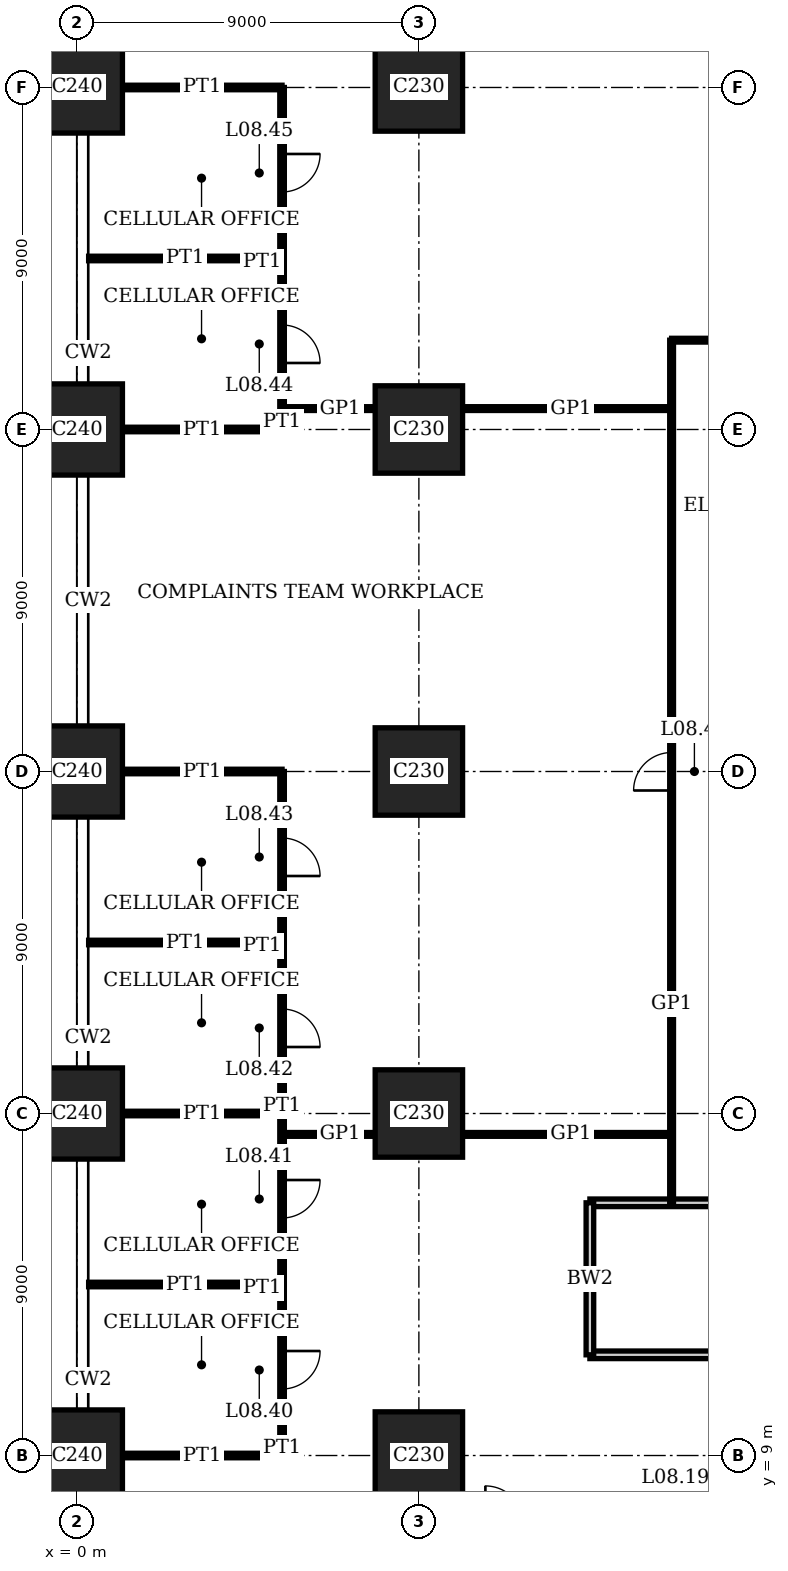
"""IFC4 building model, lengths in metres.
Left out: names, types, materials, properties, quantities, classifications, styles, units other than length and angle.
Written with IfcOpenShell. Run it as: python <this file> out.ifc"""

import sys

from ifc_helpers import new_model, si_unit, direction, frame, frame_2d, origin, origin_2d, place, context, subcontext, project, spatial, rectangle, extrude, element, fill, save


model = new_model("IFC4")
c1 = context("Model", 3, precision=1e-05, world=origin(), true_north=direction((0.0, 1.0)))
c2 = subcontext(c1, "Body", "Model", "MODEL_VIEW")
j1 = project(units=[si_unit("LENGTHUNIT", "METRE"), si_unit("PLANEANGLEUNIT", "RADIAN")], contexts=[c1])
p1 = place(None, origin())
s1 = spatial("IfcSite", under=j1, at=p1, CompositionType="ELEMENT")
p2 = place(p1, origin())
s2 = spatial("IfcBuilding", under=s1, at=p2, CompositionType="ELEMENT")
p3 = place(p2, frame((0.0, 0.0, 35.8)))
s3 = spatial("IfcBuildingStorey", under=s2, at=p3, CompositionType="ELEMENT", Elevation=35.8)
for number, where, z_axis, x_axis in (
    (1, (0.0, 9.0, 0.0), (0.0, 0.0, 1.0), (1.0, 0.0, 0.0)),
    (2, (0.0, 18.0, 0.0), (0.0, 0.0, 1.0), (1.0, 0.0, 0.0)),
    (3, (0.0, 27.0, 0.0), (0.0, 0.0, 1.0), (1.0, 0.0, 0.0)),
    (4, (0.0, 36.0, 0.0), (0.0, 0.0, 1.0), (1.0, 0.0, 0.0)),
    (5, (0.0, 45.0, 0.0), (0.0, 0.0, 1.0), (1.0, 0.0, 0.0)),
):
    element("IfcColumn", number, at=place(p3, frame(where, z_axis=z_axis, x_axis=x_axis)), inside=s3, PredefinedType="COLUMN", context=c2, shape_type="SweptSolid", body=[
        extrude(rectangle(XDim=2.4, YDim=2.4, at=origin_2d()), origin(), (0.0, 0.0, 1.0), 4.0),
    ])
for number, where, z_axis, x_axis in (
    (6, (9.0, 9.0, 0.0), (0.0, 0.0, 1.0), (1.0, 0.0, 0.0)),
    (7, (9.0, 18.0, 0.0), (0.0, 0.0, 1.0), (1.0, 0.0, 0.0)),
    (8, (9.0, 27.0, 0.0), (0.0, 0.0, 1.0), (1.0, 0.0, 0.0)),
    (9, (9.0, 36.0, 0.0), (0.0, 0.0, 1.0), (1.0, 0.0, 0.0)),
    (10, (9.0, 45.0, 0.0), (0.0, 0.0, 1.0), (1.0, 0.0, 0.0)),
):
    element("IfcColumn", number, at=place(p3, frame(where, z_axis=z_axis, x_axis=x_axis)), inside=s3, PredefinedType="COLUMN", context=c2, shape_type="SweptSolid", body=[
        extrude(rectangle(XDim=2.3, YDim=2.3, at=origin_2d()), origin(), (0.0, 0.0, 1.0), 4.0),
    ])
p4 = place(p3, frame((1.2, 9.0, 0.0), z_axis=(0.0, 0.0, 1.0), x_axis=(1.0, 0.0, 0.0)))
e11 = element("IfcWall", 11, at=p4, inside=s3, PredefinedType="PARTITIONING", context=c2, shape_type="SweptSolid", body=[
    extrude(rectangle(XDim=4.2, YDim=0.12, at=frame_2d((2.1, 0.0))), origin(), (0.0, 0.0, 1.0), 3.05),
])
p5 = place(p3, frame((13.5, 11.65, 0.0), z_axis=(0.0, 0.0, 1.0), x_axis=(1.0, 0.0, 0.0)))
e12 = element("IfcWall", 12, at=p5, inside=s3, PredefinedType="SOLIDWALL", context=c2, shape_type="SweptSolid", body=[
    extrude(rectangle(XDim=9.0, YDim=0.2, at=frame_2d((4.5, 0.0))), origin(), (0.0, 0.0, 1.0), 3.75),
])
p6 = place(p5, frame((4.0, 0.0, 0.0)))
e13 = element("IfcOpeningElement", 13, at=p6, cuts=e12, PredefinedType="OPENING", context=c2, shape_type="SweptSolid", body=[
    extrude(rectangle(XDim=1.0, YDim=2.4, at=frame_2d((0.5, 1.2))), frame((0.0, 0.11, 0.0), z_axis=(0.0, -1.0, 0.0), x_axis=(1.0, 0.0, 0.0)), (0.0, 0.0, 1.0), 0.22),
])
p7 = place(p3, frame((0.31, 13.5, 0.0), z_axis=(0.0, 0.0, 1.0), x_axis=(1.0, 0.0, 0.0)))
e14 = element("IfcWall", 14, at=p7, inside=s3, PredefinedType="PARTITIONING", context=c2, shape_type="SweptSolid", body=[
    extrude(rectangle(XDim=5.09, YDim=0.12, at=frame_2d((2.545, 0.0))), origin(), (0.0, 0.0, 1.0), 3.1),
])
p8 = place(p3, frame((13.5, 15.65, 0.0), z_axis=(0.0, 0.0, 1.0), x_axis=(1.0, 0.0, 0.0)))
e15 = element("IfcWall", 15, at=p8, inside=s3, PredefinedType="SOLIDWALL", context=c2, shape_type="SweptSolid", body=[
    extrude(rectangle(XDim=9.0, YDim=0.2, at=frame_2d((4.5, 0.0))), origin(), (0.0, 0.0, 1.0), 3.75),
])
p9 = place(p3, frame((5.39, 17.45, 0.0), z_axis=(0.0, 0.0, 1.0), x_axis=(1.0, 0.0, 0.0)))
e16 = element("IfcWall", 16, at=p9, inside=s3, PredefinedType="PARTITIONING", context=c2, shape_type="SweptSolid", body=[
    extrude(rectangle(XDim=2.46, YDim=0.1, at=frame_2d((1.23, 0.0))), origin(), (0.0, 0.0, 1.0), 3.75),
])
p10 = place(p3, frame((10.15, 17.45, 0.0), z_axis=(0.0, 0.0, 1.0), x_axis=(1.0, 0.0, 0.0)))
e17 = element("IfcWall", 17, at=p10, inside=s3, PredefinedType="PARTITIONING", context=c2, shape_type="SweptSolid", body=[
    extrude(rectangle(XDim=5.5, YDim=0.1, at=frame_2d((2.75, 0.0))), origin(), (0.0, 0.0, 1.0), 3.75),
])
p11 = place(p3, frame((1.2, 18.0, 0.0), z_axis=(0.0, 0.0, 1.0), x_axis=(1.0, 0.0, 0.0)))
e18 = element("IfcWall", 18, at=p11, inside=s3, PredefinedType="PARTITIONING", context=c2, shape_type="SweptSolid", body=[
    extrude(rectangle(XDim=4.2, YDim=0.12, at=frame_2d((2.1, 0.0))), origin(), (0.0, 0.0, 1.0), 3.05),
])
p12 = place(p3, frame((0.31, 22.5, 0.0), z_axis=(0.0, 0.0, 1.0), x_axis=(1.0, 0.0, 0.0)))
e19 = element("IfcWall", 19, at=p12, inside=s3, PredefinedType="PARTITIONING", context=c2, shape_type="SweptSolid", body=[
    extrude(rectangle(XDim=5.09, YDim=0.12, at=frame_2d((2.545, 0.0))), origin(), (0.0, 0.0, 1.0), 3.1),
])
for number, where, z_axis, x_axis in (
    (20, (1.2, 27.0, 0.0), (0.0, 0.0, 1.0), (1.0, 0.0, 0.0)),
    (21, (1.2, 36.0, 0.0), (0.0, 0.0, 1.0), (1.0, 0.0, 0.0)),
):
    element("IfcWall", number, at=place(p3, frame(where, z_axis=z_axis, x_axis=x_axis)), inside=s3, PredefinedType="PARTITIONING", context=c2, shape_type="SweptSolid", body=[
        extrude(rectangle(XDim=4.2, YDim=0.12, at=frame_2d((2.1, 0.0))), origin(), (0.0, 0.0, 1.0), 3.05),
    ])
p13 = place(p3, frame((5.39, 36.55, 0.0), z_axis=(0.0, 0.0, 1.0), x_axis=(1.0, 0.0, 0.0)))
e22 = element("IfcWall", 22, at=p13, inside=s3, PredefinedType="PARTITIONING", context=c2, shape_type="SweptSolid", body=[
    extrude(rectangle(XDim=2.46, YDim=0.1, at=frame_2d((1.23, 0.0))), origin(), (0.0, 0.0, 1.0), 3.75),
])
p14 = place(p3, frame((10.15, 36.55, 0.0), z_axis=(0.0, 0.0, 1.0), x_axis=(1.0, 0.0, 0.0)))
e23 = element("IfcWall", 23, at=p14, inside=s3, PredefinedType="PARTITIONING", context=c2, shape_type="SweptSolid", body=[
    extrude(rectangle(XDim=5.5, YDim=0.1, at=frame_2d((2.75, 0.0))), origin(), (0.0, 0.0, 1.0), 3.75),
])
p15 = place(p3, frame((15.65, 38.35, 0.0), z_axis=(0.0, 0.0, 1.0), x_axis=(1.0, 0.0, 0.0)))
e24 = element("IfcWall", 24, at=p15, inside=s3, PredefinedType="PARTITIONING", context=c2, shape_type="SweptSolid", body=[
    extrude(rectangle(XDim=24.85, YDim=0.1, at=frame_2d((12.425, 0.0))), origin(), (0.0, 0.0, 1.0), 3.75),
])
p16 = place(p15, frame((11.925, 0.0, 0.0)))
e25 = element("IfcOpeningElement", 25, at=p16, cuts=e24, PredefinedType="OPENING", context=c2, shape_type="SweptSolid", body=[
    extrude(rectangle(XDim=1.0, YDim=2.4, at=frame_2d((0.5, 1.2))), frame((0.0, 0.06, 0.0), z_axis=(0.0, -1.0, 0.0), x_axis=(1.0, 0.0, 0.0)), (0.0, 0.0, 1.0), 0.12),
])
p17 = place(p3, frame((0.31, 40.5, 0.0), z_axis=(0.0, 0.0, 1.0), x_axis=(1.0, 0.0, 0.0)))
e26 = element("IfcWall", 26, at=p17, inside=s3, PredefinedType="PARTITIONING", context=c2, shape_type="SweptSolid", body=[
    extrude(rectangle(XDim=5.09, YDim=0.12, at=frame_2d((2.545, 0.0))), origin(), (0.0, 0.0, 1.0), 3.1),
])
p18 = place(p3, frame((1.2, 45.0, 0.0), z_axis=(0.0, 0.0, 1.0), x_axis=(1.0, 0.0, 0.0)))
e27 = element("IfcWall", 27, at=p18, inside=s3, PredefinedType="PARTITIONING", context=c2, shape_type="SweptSolid", body=[
    extrude(rectangle(XDim=4.2, YDim=0.12, at=frame_2d((2.1, 0.0))), origin(), (0.0, 0.0, 1.0), 3.05),
])
p19 = place(p3, frame((5.4, 9.0, 0.0), z_axis=(0.0, 0.0, 1.0), x_axis=(0.0, 1.0, 0.0)))
e28 = element("IfcWall", 28, at=p19, inside=s3, PredefinedType="PARTITIONING", context=c2, shape_type="SweptSolid", body=[
    extrude(rectangle(XDim=4.5, YDim=0.12, at=frame_2d((2.25, 0.0))), origin(), (0.0, 0.0, 1.0), 3.75),
])
p20 = place(p19, frame((1.75, 0.0, 0.0)))
e29 = element("IfcOpeningElement", 29, at=p20, cuts=e28, PredefinedType="OPENING", context=c2, shape_type="SweptSolid", body=[
    extrude(rectangle(XDim=1.0, YDim=2.4, at=frame_2d((0.5, 1.2))), frame((0.0, 0.07, 0.0), z_axis=(0.0, -1.0, 0.0), x_axis=(1.0, 0.0, 0.0)), (0.0, 0.0, 1.0), 0.14),
])
p21 = place(p3, frame((5.4, 13.5, 0.0), z_axis=(0.0, 0.0, 1.0), x_axis=(0.0, 1.0, 0.0)))
e30 = element("IfcWall", 30, at=p21, inside=s3, PredefinedType="PARTITIONING", context=c2, shape_type="SweptSolid", body=[
    extrude(rectangle(XDim=4.5, YDim=0.12, at=frame_2d((2.25, 0.0))), origin(), (0.0, 0.0, 1.0), 3.75),
])
p22 = place(p21, frame((1.75, 0.0, 0.0)))
e31 = element("IfcOpeningElement", 31, at=p22, cuts=e30, PredefinedType="OPENING", context=c2, shape_type="SweptSolid", body=[
    extrude(rectangle(XDim=1.0, YDim=2.4, at=frame_2d((0.5, 1.2))), frame((0.0, 0.07, 0.0), z_axis=(0.0, -1.0, 0.0), x_axis=(1.0, 0.0, 0.0)), (0.0, 0.0, 1.0), 0.14),
])
p23 = place(p3, frame((5.4, 18.0, 0.0), z_axis=(0.0, 0.0, 1.0), x_axis=(0.0, 1.0, 0.0)))
e32 = element("IfcWall", 32, at=p23, inside=s3, PredefinedType="PARTITIONING", context=c2, shape_type="SweptSolid", body=[
    extrude(rectangle(XDim=4.5, YDim=0.12, at=frame_2d((2.25, 0.0))), origin(), (0.0, 0.0, 1.0), 3.75),
])
p24 = place(p23, frame((1.75, 0.0, 0.0)))
e33 = element("IfcOpeningElement", 33, at=p24, cuts=e32, PredefinedType="OPENING", context=c2, shape_type="SweptSolid", body=[
    extrude(rectangle(XDim=1.0, YDim=2.4, at=frame_2d((0.5, 1.2))), frame((0.0, 0.07, 0.0), z_axis=(0.0, -1.0, 0.0), x_axis=(1.0, 0.0, 0.0)), (0.0, 0.0, 1.0), 0.14),
])
p25 = place(p3, frame((5.4, 22.5, 0.0), z_axis=(0.0, 0.0, 1.0), x_axis=(0.0, 1.0, 0.0)))
e34 = element("IfcWall", 34, at=p25, inside=s3, PredefinedType="PARTITIONING", context=c2, shape_type="SweptSolid", body=[
    extrude(rectangle(XDim=4.5, YDim=0.12, at=frame_2d((2.25, 0.0))), origin(), (0.0, 0.0, 1.0), 3.75),
])
p26 = place(p25, frame((1.75, 0.0, 0.0)))
e35 = element("IfcOpeningElement", 35, at=p26, cuts=e34, PredefinedType="OPENING", context=c2, shape_type="SweptSolid", body=[
    extrude(rectangle(XDim=1.0, YDim=2.4, at=frame_2d((0.5, 1.2))), frame((0.0, 0.07, 0.0), z_axis=(0.0, -1.0, 0.0), x_axis=(1.0, 0.0, 0.0)), (0.0, 0.0, 1.0), 0.14),
])
p27 = place(p3, frame((5.4, 36.0, 0.0), z_axis=(0.0, 0.0, 1.0), x_axis=(0.0, 1.0, 0.0)))
e36 = element("IfcWall", 36, at=p27, inside=s3, PredefinedType="PARTITIONING", context=c2, shape_type="SweptSolid", body=[
    extrude(rectangle(XDim=4.5, YDim=0.12, at=frame_2d((2.25, 0.0))), origin(), (0.0, 0.0, 1.0), 3.75),
])
p28 = place(p27, frame((1.75, 0.0, 0.0)))
e37 = element("IfcOpeningElement", 37, at=p28, cuts=e36, PredefinedType="OPENING", context=c2, shape_type="SweptSolid", body=[
    extrude(rectangle(XDim=1.0, YDim=2.4, at=frame_2d((0.5, 1.2))), frame((0.0, 0.07, 0.0), z_axis=(0.0, -1.0, 0.0), x_axis=(1.0, 0.0, 0.0)), (0.0, 0.0, 1.0), 0.14),
])
p29 = place(p3, frame((5.4, 40.5, 0.0), z_axis=(0.0, 0.0, 1.0), x_axis=(0.0, 1.0, 0.0)))
e38 = element("IfcWall", 38, at=p29, inside=s3, PredefinedType="PARTITIONING", context=c2, shape_type="SweptSolid", body=[
    extrude(rectangle(XDim=4.5, YDim=0.12, at=frame_2d((2.25, 0.0))), origin(), (0.0, 0.0, 1.0), 3.75),
])
p30 = place(p29, frame((1.75, 0.0, 0.0)))
e39 = element("IfcOpeningElement", 39, at=p30, cuts=e38, PredefinedType="OPENING", context=c2, shape_type="SweptSolid", body=[
    extrude(rectangle(XDim=1.0, YDim=2.4, at=frame_2d((0.5, 1.2))), frame((0.0, 0.07, 0.0), z_axis=(0.0, -1.0, 0.0), x_axis=(1.0, 0.0, 0.0)), (0.0, 0.0, 1.0), 0.14),
])
p31 = place(p3, frame((13.5, 11.65, 0.0), z_axis=(0.0, 0.0, 1.0), x_axis=(0.0, 1.0, 0.0)))
e40 = element("IfcWall", 40, at=p31, inside=s3, PredefinedType="SOLIDWALL", context=c2, shape_type="SweptSolid", body=[
    extrude(rectangle(XDim=4.0, YDim=0.2, at=frame_2d((2.0, 0.0))), origin(), (0.0, 0.0, 1.0), 3.75),
])
p32 = place(p3, frame((15.65, 15.65, 0.0), z_axis=(0.0, 0.0, 1.0), x_axis=(0.0, 1.0, 0.0)))
e41 = element("IfcWall", 41, at=p32, inside=s3, PredefinedType="PARTITIONING", context=c2, shape_type="SweptSolid", body=[
    extrude(rectangle(XDim=22.7, YDim=0.1, at=frame_2d((11.35, 0.0))), origin(), (0.0, 0.0, 1.0), 3.75),
])
p33 = place(p32, frame((10.85, 0.0, 0.0)))
e42 = element("IfcOpeningElement", 42, at=p33, cuts=e41, PredefinedType="OPENING", context=c2, shape_type="SweptSolid", body=[
    extrude(rectangle(XDim=1.0, YDim=2.4, at=frame_2d((0.5, 1.2))), frame((0.0, 0.06, 0.0), z_axis=(0.0, -1.0, 0.0), x_axis=(1.0, 0.0, 0.0)), (0.0, 0.0, 1.0), 0.12),
])
p34 = place(p20, origin())
e43 = element("IfcDoor", 43, at=p34, inside=s3, OperationType="SINGLE_SWING_RIGHT", PredefinedType="DOOR", context=c2, shape_type="SweptSolid", body=[
    extrude(rectangle(XDim=1.0, YDim=2.4, at=frame_2d((0.5, 1.2))), frame((0.0, 0.025, 0.0), z_axis=(0.0, -1.0, 0.0), x_axis=(1.0, 0.0, 0.0)), (0.0, 0.0, 1.0), 0.05),
])
fill(e29, e43)
p35 = place(p22, origin())
e44 = element("IfcDoor", 44, at=p35, inside=s3, OperationType="SINGLE_SWING_RIGHT", PredefinedType="DOOR", context=c2, shape_type="SweptSolid", body=[
    extrude(rectangle(XDim=1.0, YDim=2.4, at=frame_2d((0.5, 1.2))), frame((0.0, 0.025, 0.0), z_axis=(0.0, -1.0, 0.0), x_axis=(1.0, 0.0, 0.0)), (0.0, 0.0, 1.0), 0.05),
])
fill(e31, e44)
p36 = place(p24, origin())
e45 = element("IfcDoor", 45, at=p36, inside=s3, OperationType="SINGLE_SWING_LEFT", PredefinedType="DOOR", context=c2, shape_type="SweptSolid", body=[
    extrude(rectangle(XDim=1.0, YDim=2.4, at=frame_2d((0.5, 1.2))), frame((0.0, 0.025, 0.0), z_axis=(0.0, -1.0, 0.0), x_axis=(1.0, 0.0, 0.0)), (0.0, 0.0, 1.0), 0.05),
])
fill(e33, e45)
p37 = place(p26, origin())
e46 = element("IfcDoor", 46, at=p37, inside=s3, OperationType="SINGLE_SWING_LEFT", PredefinedType="DOOR", context=c2, shape_type="SweptSolid", body=[
    extrude(rectangle(XDim=1.0, YDim=2.4, at=frame_2d((0.5, 1.2))), frame((0.0, 0.025, 0.0), z_axis=(0.0, -1.0, 0.0), x_axis=(1.0, 0.0, 0.0)), (0.0, 0.0, 1.0), 0.05),
])
fill(e35, e46)
p38 = place(p28, origin())
e47 = element("IfcDoor", 47, at=p38, inside=s3, OperationType="SINGLE_SWING_LEFT", PredefinedType="DOOR", context=c2, shape_type="SweptSolid", body=[
    extrude(rectangle(XDim=1.0, YDim=2.4, at=frame_2d((0.5, 1.2))), frame((0.0, 0.025, 0.0), z_axis=(0.0, -1.0, 0.0), x_axis=(1.0, 0.0, 0.0)), (0.0, 0.0, 1.0), 0.05),
])
fill(e37, e47)
p39 = place(p30, origin())
e48 = element("IfcDoor", 48, at=p39, inside=s3, OperationType="SINGLE_SWING_RIGHT", PredefinedType="DOOR", context=c2, shape_type="SweptSolid", body=[
    extrude(rectangle(XDim=1.0, YDim=2.4, at=frame_2d((0.5, 1.2))), frame((0.0, 0.025, 0.0), z_axis=(0.0, -1.0, 0.0), x_axis=(1.0, 0.0, 0.0)), (0.0, 0.0, 1.0), 0.05),
])
fill(e39, e48)
p40 = place(p33, origin())
e49 = element("IfcDoor", 49, at=p40, inside=s3, OperationType="SINGLE_SWING_RIGHT", PredefinedType="DOOR", context=c2, shape_type="SweptSolid", body=[
    extrude(rectangle(XDim=1.0, YDim=2.4, at=frame_2d((0.5, 1.2))), frame((0.0, 0.02, 0.0), z_axis=(0.0, -1.0, 0.0), x_axis=(1.0, 0.0, 0.0)), (0.0, 0.0, 1.0), 0.04),
])
fill(e42, e49)
save(model, sys.argv[1])
